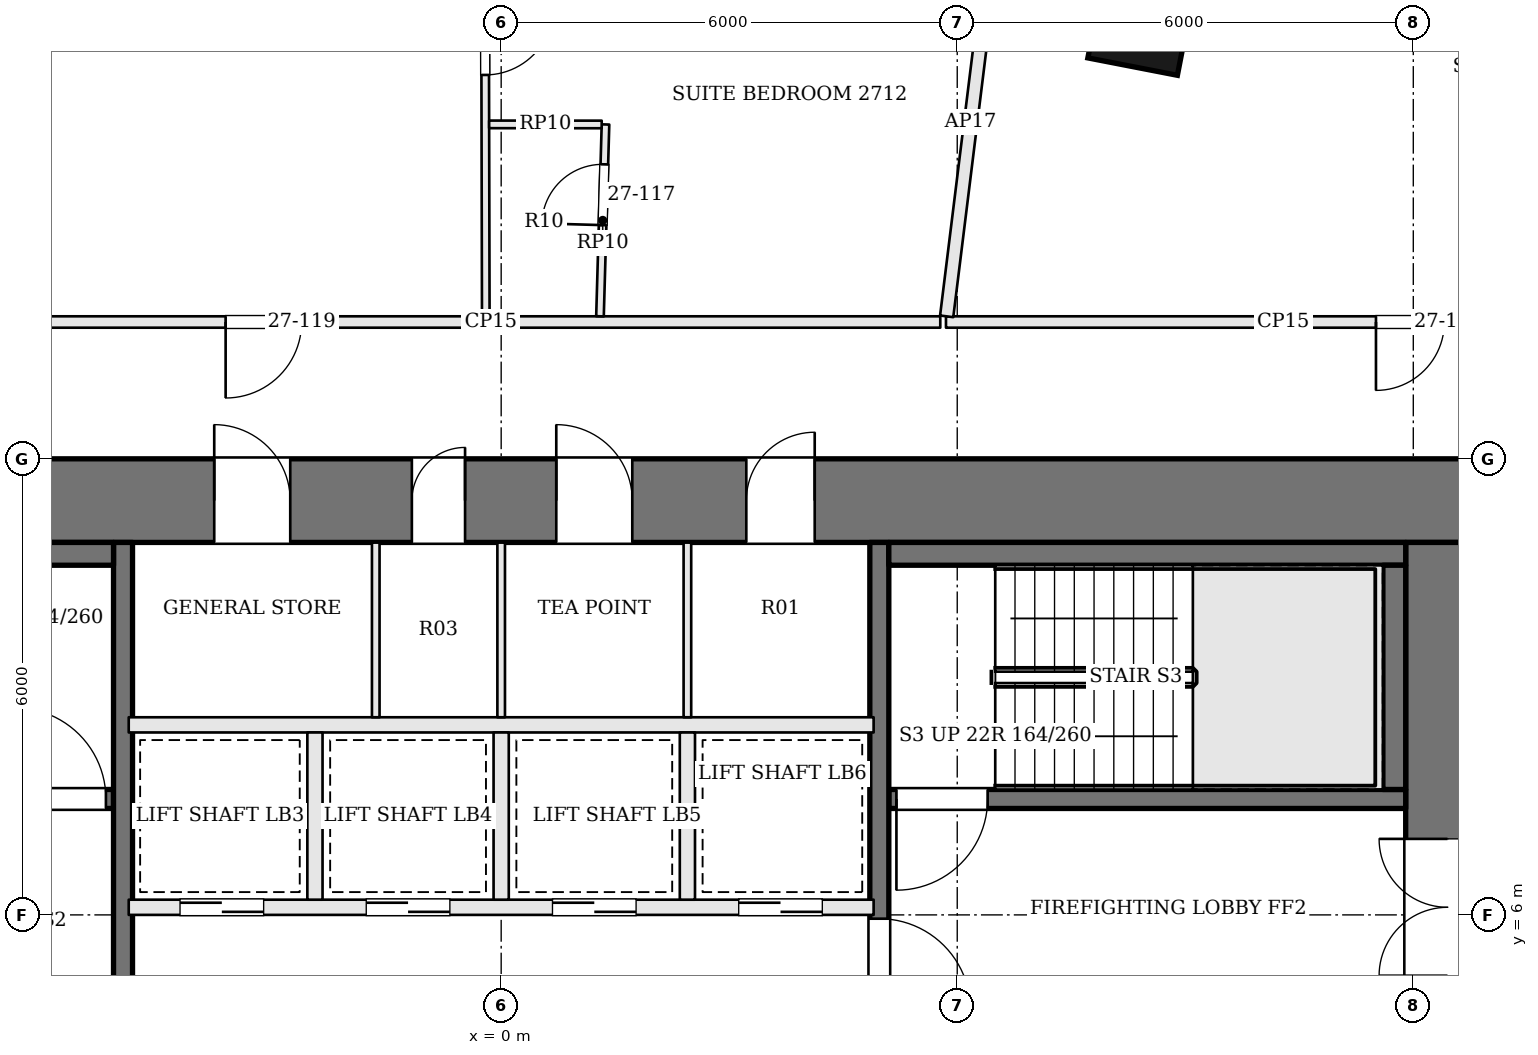
"""IFC4 building model, lengths in metres.
Left out: names, types, materials, properties, quantities, classifications, styles, units other than length and angle.
Written with IfcOpenShell. Run it as: python <this file> out.ifc"""

import sys

from ifc_helpers import new_model, si_unit, direction, frame, frame_2d, origin, origin_2d, place, context, subcontext, project, spatial, rectangle, extrude, element, fill, save


model = new_model("IFC4")
c1 = context("Model", 3, precision=1e-05, world=origin(), true_north=direction((0.0, 1.0)))
c2 = subcontext(c1, "Body", "Model", "MODEL_VIEW")
j1 = project(units=[si_unit("LENGTHUNIT", "METRE"), si_unit("PLANEANGLEUNIT", "RADIAN")], contexts=[c1])
p1 = place(None, origin())
s1 = spatial("IfcSite", under=j1, at=p1, CompositionType="ELEMENT")
p2 = place(p1, origin())
s2 = spatial("IfcBuilding", under=s1, at=p2, CompositionType="ELEMENT")
p3 = place(p2, frame((0.0, 0.0, 114.0)))
s3 = spatial("IfcBuildingStorey", under=s2, at=p3, CompositionType="ELEMENT", Elevation=114.0)
p4 = place(p3, frame((-13.0, 11.45, 0.0), z_axis=(0.0, 0.0, 1.0), x_axis=(1.0, 0.0, 0.0)))
e1 = element("IfcWall", 1, at=p4, inside=s3, PredefinedType="SHEAR", context=c2, shape_type="SweptSolid", body=[
    extrude(rectangle(XDim=26.0, YDim=1.1, at=frame_2d((13.0, 0.0))), origin(), (0.0, 0.0, 1.0), 3.6),
])
p5 = place(p4, frame((9.225, 0.0, 0.0)))
e2 = element("IfcOpeningElement", 2, at=p5, cuts=e1, PredefinedType="OPENING", context=c2, shape_type="SweptSolid", body=[
    extrude(rectangle(XDim=1.0, YDim=2.1, at=frame_2d((0.5, 1.05))), frame((0.0, 0.56, 0.0), z_axis=(0.0, -1.0, 0.0), x_axis=(1.0, 0.0, 0.0)), (0.0, 0.0, 1.0), 1.12),
])
p6 = place(p4, frame((11.825, 0.0, 0.0)))
e3 = element("IfcOpeningElement", 3, at=p6, cuts=e1, PredefinedType="OPENING", context=c2, shape_type="SweptSolid", body=[
    extrude(rectangle(XDim=0.7, YDim=2.1, at=frame_2d((0.35, 1.05))), frame((0.0, 0.56, 0.0), z_axis=(0.0, -1.0, 0.0), x_axis=(1.0, 0.0, 0.0)), (0.0, 0.0, 1.0), 1.12),
])
p7 = place(p4, frame((13.725, 0.0, 0.0)))
e4 = element("IfcOpeningElement", 4, at=p7, cuts=e1, PredefinedType="OPENING", context=c2, shape_type="SweptSolid", body=[
    extrude(rectangle(XDim=1.0, YDim=2.1, at=frame_2d((0.5, 1.05))), frame((0.0, 0.56, 0.0), z_axis=(0.0, -1.0, 0.0), x_axis=(1.0, 0.0, 0.0)), (0.0, 0.0, 1.0), 1.12),
])
p8 = place(p4, frame((16.225, 0.0, 0.0)))
e5 = element("IfcOpeningElement", 5, at=p8, cuts=e1, PredefinedType="OPENING", context=c2, shape_type="SweptSolid", body=[
    extrude(rectangle(XDim=0.9, YDim=2.1, at=frame_2d((0.45, 1.05))), frame((0.0, 0.56, 0.0), z_axis=(0.0, -1.0, 0.0), x_axis=(1.0, 0.0, 0.0)), (0.0, 0.0, 1.0), 1.12),
])
p9 = place(p3, frame((12.45, -1.9, 0.0), z_axis=(0.0, 0.0, 1.0), x_axis=(0.0, 1.0, 0.0)))
e6 = element("IfcWall", 6, at=p9, inside=s3, PredefinedType="SHEAR", context=c2, shape_type="SweptSolid", body=[
    extrude(rectangle(XDim=12.8, YDim=1.1, at=frame_2d((6.4, 0.0))), origin(), (0.0, 0.0, 1.0), 3.6),
])
p10 = place(p9, frame((7.1, 0.0, 0.0)))
e7 = element("IfcOpeningElement", 7, at=p10, cuts=e6, PredefinedType="OPENING", context=c2, shape_type="SweptSolid", body=[
    extrude(rectangle(XDim=1.8, YDim=2.1, at=frame_2d((0.9, 1.05))), frame((0.0, 0.56, 0.0), z_axis=(0.0, -1.0, 0.0), x_axis=(1.0, 0.0, 0.0)), (0.0, 0.0, 1.0), 1.12),
])
p11 = place(p3, frame((8.422, 17.749, 0.0), z_axis=(0.0, 0.0, 1.0), x_axis=(-0.981654668733, 0.19066754143, 0.0)))
e8 = element("IfcColumn", 8, at=p11, inside=s3, PredefinedType="COLUMN", context=c2, shape_type="SweptSolid", body=[
    extrude(rectangle(XDim=1.2, YDim=1.2, at=origin_2d()), origin(), (0.0, 0.0, 1.0), 3.6),
])
p12 = place(p3, frame((11.9, 7.525, 0.0), z_axis=(0.0, 0.0, 1.0), x_axis=(-1.0, 0.0, 0.0)))
e9 = element("IfcWall", 9, at=p12, inside=s3, PredefinedType="SOLIDWALL", context=c2, shape_type="SweptSolid", body=[
    extrude(rectangle(XDim=6.8, YDim=0.25, at=frame_2d((3.4, 0.0))), origin(), (0.0, 0.0, 1.0), 3.4),
])
p13 = place(p12, frame((5.5, 0.0, 0.0)))
e10 = element("IfcOpeningElement", 10, at=p13, cuts=e9, PredefinedType="OPENING", context=c2, shape_type="SweptSolid", body=[
    extrude(rectangle(XDim=1.2, YDim=2.1, at=frame_2d((0.6, 1.05))), frame((0.0, 0.135, 0.0), z_axis=(0.0, -1.0, 0.0), x_axis=(1.0, 0.0, 0.0)), (0.0, 0.0, 1.0), 0.27),
])
p14 = place(p3, frame((-11.9, 7.525, 0.0), z_axis=(0.0, 0.0, 1.0), x_axis=(1.0, 0.0, 0.0)))
e11 = element("IfcWall", 11, at=p14, inside=s3, PredefinedType="SOLIDWALL", context=c2, shape_type="SweptSolid", body=[
    extrude(rectangle(XDim=6.8, YDim=0.25, at=frame_2d((3.4, 0.0))), origin(), (0.0, 0.0, 1.0), 3.4),
])
p15 = place(p14, frame((5.5, 0.0, 0.0)))
e12 = element("IfcOpeningElement", 12, at=p15, cuts=e11, PredefinedType="OPENING", context=c2, shape_type="SweptSolid", body=[
    extrude(rectangle(XDim=1.2, YDim=2.1, at=frame_2d((0.6, 1.05))), frame((0.0, 0.135, 0.0), z_axis=(0.0, -1.0, 0.0), x_axis=(1.0, 0.0, 0.0)), (0.0, 0.0, 1.0), 0.27),
])
p16 = place(p3, frame((-4.975, -1.9, 0.0), z_axis=(0.0, 0.0, 1.0), x_axis=(0.0, 1.0, 0.0)))
e13 = element("IfcWall", 13, at=p16, inside=s3, PredefinedType="SOLIDWALL", context=c2, shape_type="SweptSolid", body=[
    extrude(rectangle(XDim=12.8, YDim=0.25, at=frame_2d((6.4, 0.0))), origin(), (0.0, 0.0, 1.0), 3.4),
])
p17 = place(p16, frame((4.95, 0.0, 0.0)))
e14 = element("IfcOpeningElement", 14, at=p17, cuts=e13, PredefinedType="OPENING", context=c2, shape_type="SweptSolid", body=[
    extrude(rectangle(XDim=1.2, YDim=2.1, at=frame_2d((0.6, 1.05))), frame((0.0, 0.135, 0.0), z_axis=(0.0, -1.0, 0.0), x_axis=(1.0, 0.0, 0.0)), (0.0, 0.0, 1.0), 0.27),
])
p18 = place(p3, frame((4.975, 10.9, 0.0), z_axis=(0.0, 0.0, 1.0), x_axis=(0.0, -1.0, 0.0)))
e15 = element("IfcWall", 15, at=p18, inside=s3, PredefinedType="SOLIDWALL", context=c2, shape_type="SweptSolid", body=[
    extrude(rectangle(XDim=12.8, YDim=0.25, at=frame_2d((6.4, 0.0))), origin(), (0.0, 0.0, 1.0), 3.4),
])
p19 = place(p18, frame((4.95, 0.0, 0.0)))
e16 = element("IfcOpeningElement", 16, at=p19, cuts=e15, PredefinedType="OPENING", context=c2, shape_type="SweptSolid", body=[
    extrude(rectangle(XDim=1.2, YDim=2.1, at=frame_2d((0.6, 1.05))), frame((0.0, 0.135, 0.0), z_axis=(0.0, -1.0, 0.0), x_axis=(1.0, 0.0, 0.0)), (0.0, 0.0, 1.0), 0.27),
])
for number, where, z_axis, x_axis in (
    (17, (-11.9, 10.75, 0.0), (0.0, 0.0, 1.0), (1.0, 0.0, 0.0)),
    (18, (11.9, 10.75, 0.0), (0.0, 0.0, 1.0), (-1.0, 0.0, 0.0)),
):
    element("IfcWall", number, at=place(p3, frame(where, z_axis=z_axis, x_axis=x_axis)), inside=s3, PredefinedType="SOLIDWALL", context=c2, shape_type="SweptSolid", body=[
        extrude(rectangle(XDim=6.8, YDim=0.3, at=frame_2d((3.4, 0.0))), origin(), (0.0, 0.0, 1.0), 3.4),
    ])
p20 = place(p3, frame((11.75, 10.6, 0.0), z_axis=(0.0, 0.0, 1.0), x_axis=(0.0, -1.0, 0.0)))
e19 = element("IfcWall", 19, at=p20, inside=s3, PredefinedType="SOLIDWALL", context=c2, shape_type="SweptSolid", body=[
    extrude(rectangle(XDim=2.95, YDim=0.3, at=frame_2d((1.475, 0.0))), origin(), (0.0, 0.0, 1.0), 3.4),
])
p21 = place(p3, frame((-4.9, 6.1, 0.0), z_axis=(0.0, 0.0, 1.0), x_axis=(1.0, 0.0, 0.0)))
e20 = element("IfcWall", 20, at=p21, inside=s3, PredefinedType="SOLIDWALL", context=c2, shape_type="SweptSolid", body=[
    extrude(rectangle(XDim=9.8, YDim=0.2, at=frame_2d((4.9, 0.0))), origin(), (0.0, 0.0, 1.0), 3.4),
])
p22 = place(p21, frame((0.675, 0.0, 0.0)))
e21 = element("IfcOpeningElement", 21, at=p22, cuts=e20, PredefinedType="OPENING", context=c2, shape_type="SweptSolid", body=[
    extrude(rectangle(XDim=1.1, YDim=2.1, at=frame_2d((0.55, 1.05))), frame((0.0, 0.11, 0.0), z_axis=(0.0, -1.0, 0.0), x_axis=(1.0, 0.0, 0.0)), (0.0, 0.0, 1.0), 0.22),
])
p23 = place(p21, frame((3.125, 0.0, 0.0)))
e22 = element("IfcOpeningElement", 22, at=p23, cuts=e20, PredefinedType="OPENING", context=c2, shape_type="SweptSolid", body=[
    extrude(rectangle(XDim=1.1, YDim=2.1, at=frame_2d((0.55, 1.05))), frame((0.0, 0.11, 0.0), z_axis=(0.0, -1.0, 0.0), x_axis=(1.0, 0.0, 0.0)), (0.0, 0.0, 1.0), 0.22),
])
p24 = place(p21, frame((5.575, 0.0, 0.0)))
e23 = element("IfcOpeningElement", 23, at=p24, cuts=e20, PredefinedType="OPENING", context=c2, shape_type="SweptSolid", body=[
    extrude(rectangle(XDim=1.1, YDim=2.1, at=frame_2d((0.55, 1.05))), frame((0.0, 0.11, 0.0), z_axis=(0.0, -1.0, 0.0), x_axis=(1.0, 0.0, 0.0)), (0.0, 0.0, 1.0), 0.22),
])
p25 = place(p21, frame((8.025, 0.0, 0.0)))
e24 = element("IfcOpeningElement", 24, at=p25, cuts=e20, PredefinedType="OPENING", context=c2, shape_type="SweptSolid", body=[
    extrude(rectangle(XDim=1.1, YDim=2.1, at=frame_2d((0.55, 1.05))), frame((0.0, 0.11, 0.0), z_axis=(0.0, -1.0, 0.0), x_axis=(1.0, 0.0, 0.0)), (0.0, 0.0, 1.0), 0.22),
])
p26 = place(p3, frame((-4.9, 8.5, 0.0), z_axis=(0.0, 0.0, 1.0), x_axis=(1.0, 0.0, 0.0)))
e25 = element("IfcWall", 25, at=p26, inside=s3, PredefinedType="SOLIDWALL", context=c2, shape_type="SweptSolid", body=[
    extrude(rectangle(XDim=9.8, YDim=0.2, at=frame_2d((4.9, 0.0))), origin(), (0.0, 0.0, 1.0), 3.4),
])
for number, where, z_axis, x_axis in (
    (26, (-2.45, 6.2, 0.0), (0.0, 0.0, 1.0), (0.0, 1.0, 0.0)),
    (27, (0.0, 6.2, 0.0), (0.0, 0.0, 1.0), (0.0, 1.0, 0.0)),
    (28, (2.45, 6.2, 0.0), (0.0, 0.0, 1.0), (0.0, 1.0, 0.0)),
):
    element("IfcWall", number, at=place(p3, frame(where, z_axis=z_axis, x_axis=x_axis)), inside=s3, PredefinedType="SOLIDWALL", context=c2, shape_type="SweptSolid", body=[
        extrude(rectangle(XDim=2.2, YDim=0.2, at=frame_2d((1.1, 0.0))), origin(), (0.0, 0.0, 1.0), 3.4),
    ])
for number, where, z_axis, x_axis in (
    (29, (-1.65, 8.6, 0.0), (0.0, 0.0, 1.0), (0.0, 1.0, 0.0)),
    (30, (0.0, 8.6, 0.0), (0.0, 0.0, 1.0), (0.0, 1.0, 0.0)),
    (31, (2.45, 8.6, 0.0), (0.0, 0.0, 1.0), (0.0, 1.0, 0.0)),
):
    element("IfcWall", number, at=place(p3, frame(where, z_axis=z_axis, x_axis=x_axis)), inside=s3, PredefinedType="PARTITIONING", context=c2, shape_type="SweptSolid", body=[
        extrude(rectangle(XDim=2.3, YDim=0.1, at=frame_2d((1.15, 0.0))), origin(), (0.0, 0.0, 1.0), 3.4),
    ])
p27 = place(p3, frame((14.725, 13.8, 0.0), z_axis=(0.0, 0.0, 1.0), x_axis=(-1.0, 0.0, 0.0)))
e32 = element("IfcWall", 32, at=p27, inside=s3, PredefinedType="PARTITIONING", context=c2, shape_type="SweptSolid", body=[
    extrude(rectangle(XDim=8.873, YDim=0.15, at=frame_2d((4.437, 0.0))), origin(), (0.0, 0.0, 1.0), 2.784),
])
p28 = place(p27, frame((2.316, 0.0, 0.0)))
e33 = element("IfcOpeningElement", 33, at=p28, cuts=e32, PredefinedType="OPENING", context=c2, shape_type="SweptSolid", body=[
    extrude(rectangle(XDim=0.9, YDim=2.4, at=frame_2d((0.45, 1.2))), frame((0.0, 0.085, 0.0), z_axis=(0.0, -1.0, 0.0), x_axis=(1.0, 0.0, 0.0)), (0.0, 0.0, 1.0), 0.17),
])
p29 = place(p3, frame((6.493, 18.982, 0.0), z_axis=(0.0, 0.0, 1.0), x_axis=(-0.122808633413, -0.992430370131, 0.0)))
e34 = element("IfcWall", 34, at=p29, inside=s3, PredefinedType="PARTITIONING", context=c2, shape_type="SweptSolid", body=[
    extrude(rectangle(XDim=5.147, YDim=0.175, at=frame_2d((2.573, 0.0))), origin(), (0.0, 0.0, 1.0), 2.784),
])
p30 = place(p3, frame((5.777, 13.8, 0.0), z_axis=(0.0, 0.0, 1.0), x_axis=(-1.0, 0.0, 0.0)))
e35 = element("IfcWall", 35, at=p30, inside=s3, PredefinedType="PARTITIONING", context=c2, shape_type="SweptSolid", body=[
    extrude(rectangle(XDim=11.824, YDim=0.15, at=frame_2d((5.912, 0.0))), origin(), (0.0, 0.0, 1.0), 2.784),
])
p31 = place(p30, frame((8.402, 0.0, 0.0)))
e36 = element("IfcOpeningElement", 36, at=p31, cuts=e35, PredefinedType="OPENING", context=c2, shape_type="SweptSolid", body=[
    extrude(rectangle(XDim=1.0, YDim=2.1, at=frame_2d((0.5, 1.05))), frame((0.0, 0.085, 0.0), z_axis=(0.0, -1.0, 0.0), x_axis=(1.0, 0.0, 0.0)), (0.0, 0.0, 1.0), 0.17),
])
p32 = place(p3, frame((-0.219, 21.059, 0.0), z_axis=(0.0, 0.0, 1.0), x_axis=(0.002344778955, -0.999997251002, 0.0)))
e37 = element("IfcWall", 37, at=p32, inside=s3, PredefinedType="PARTITIONING", context=c2, shape_type="SweptSolid", body=[
    extrude(rectangle(XDim=7.184, YDim=0.1, at=frame_2d((3.592, 0.0))), origin(), (0.0, 0.0, 1.0), 2.884),
])
p33 = place(p32, frame((3.109, 0.0, 0.0)))
e38 = element("IfcOpeningElement", 38, at=p33, cuts=e37, PredefinedType="OPENING", context=c2, shape_type="SweptSolid", body=[
    extrude(rectangle(XDim=0.9, YDim=2.4, at=frame_2d((0.45, 1.2))), frame((0.0, 0.06, 0.0), z_axis=(0.0, -1.0, 0.0), x_axis=(1.0, 0.0, 0.0)), (0.0, 0.0, 1.0), 0.12),
])
p34 = place(p3, frame((1.3, 13.875, 0.0), z_axis=(0.0, 0.0, 1.0), x_axis=(0.028620501399, 0.999590349543, 0.0)))
e39 = element("IfcWall", 39, at=p34, inside=s3, PredefinedType="PARTITIONING", context=c2, shape_type="SweptSolid", body=[
    extrude(rectangle(XDim=2.525, YDim=0.1, at=frame_2d((1.262, 0.0))), origin(), (0.0, 0.0, 1.0), 2.884),
])
p35 = place(p34, frame((1.2, 0.0, 0.0)))
e40 = element("IfcOpeningElement", 40, at=p35, cuts=e39, PredefinedType="OPENING", context=c2, shape_type="SweptSolid", body=[
    extrude(rectangle(XDim=0.8, YDim=2.1, at=frame_2d((0.4, 1.05))), frame((0.0, 0.06, 0.0), z_axis=(0.0, -1.0, 0.0), x_axis=(1.0, 0.0, 0.0)), (0.0, 0.0, 1.0), 0.12),
])
p36 = place(p3, frame((1.323, 16.399, 0.0), z_axis=(0.0, 0.0, 1.0), x_axis=(-0.999999782516, 0.000659521703, 0.0)))
e41 = element("IfcWall", 41, at=p36, inside=s3, PredefinedType="PARTITIONING", context=c2, shape_type="SweptSolid", body=[
    extrude(rectangle(XDim=1.481, YDim=0.1, at=frame_2d((0.74, 0.0))), origin(), (0.0, 0.0, 1.0), 2.884),
])
p37 = place(p10, origin())
e42 = element("IfcDoor", 42, at=p37, inside=s3, OperationType="DOUBLE_DOOR_SINGLE_SWING", PredefinedType="DOOR", context=c2, shape_type="SweptSolid", body=[
    extrude(rectangle(XDim=1.8, YDim=2.1, at=frame_2d((0.9, 1.05))), frame((0.0, 0.025, 0.0), z_axis=(0.0, -1.0, 0.0), x_axis=(1.0, 0.0, 0.0)), (0.0, 0.0, 1.0), 0.05),
])
fill(e7, e42)
p38 = place(p19, origin())
e43 = element("IfcDoor", 43, at=p38, inside=s3, OperationType="SINGLE_SWING_RIGHT", PredefinedType="DOOR", context=c2, shape_type="SweptSolid", body=[
    extrude(rectangle(XDim=1.2, YDim=2.1, at=frame_2d((0.6, 1.05))), frame((0.0, 0.025, 0.0), z_axis=(0.0, -1.0, 0.0), x_axis=(1.0, 0.0, 0.0)), (0.0, 0.0, 1.0), 0.05),
])
fill(e16, e43)
p39 = place(p13, origin())
e44 = element("IfcDoor", 44, at=p39, inside=s3, OperationType="SINGLE_SWING_RIGHT", PredefinedType="DOOR", context=c2, shape_type="SweptSolid", body=[
    extrude(rectangle(XDim=1.2, YDim=2.1, at=frame_2d((0.6, 1.05))), frame((0.0, 0.025, 0.0), z_axis=(0.0, -1.0, 0.0), x_axis=(1.0, 0.0, 0.0)), (0.0, 0.0, 1.0), 0.05),
])
fill(e10, e44)
p40 = place(p15, origin())
e45 = element("IfcDoor", 45, at=p40, inside=s3, OperationType="SINGLE_SWING_LEFT", PredefinedType="DOOR", context=c2, shape_type="SweptSolid", body=[
    extrude(rectangle(XDim=1.2, YDim=2.1, at=frame_2d((0.6, 1.05))), frame((0.0, 0.025, 0.0), z_axis=(0.0, -1.0, 0.0), x_axis=(1.0, 0.0, 0.0)), (0.0, 0.0, 1.0), 0.05),
])
fill(e12, e45)
p41 = place(p22, origin())
e46 = element("IfcDoor", 46, at=p41, inside=s3, OperationType="SLIDING_TO_RIGHT", PredefinedType="DOOR", context=c2, shape_type="SweptSolid", body=[
    extrude(rectangle(XDim=1.1, YDim=2.1, at=frame_2d((0.55, 1.05))), frame((0.0, 0.025, 0.0), z_axis=(0.0, -1.0, 0.0), x_axis=(1.0, 0.0, 0.0)), (0.0, 0.0, 1.0), 0.05),
])
fill(e21, e46)
p42 = place(p23, origin())
e47 = element("IfcDoor", 47, at=p42, inside=s3, OperationType="SLIDING_TO_LEFT", PredefinedType="DOOR", context=c2, shape_type="SweptSolid", body=[
    extrude(rectangle(XDim=1.1, YDim=2.1, at=frame_2d((0.55, 1.05))), frame((0.0, 0.025, 0.0), z_axis=(0.0, -1.0, 0.0), x_axis=(1.0, 0.0, 0.0)), (0.0, 0.0, 1.0), 0.05),
])
fill(e22, e47)
p43 = place(p24, origin())
e48 = element("IfcDoor", 48, at=p43, inside=s3, OperationType="SLIDING_TO_RIGHT", PredefinedType="DOOR", context=c2, shape_type="SweptSolid", body=[
    extrude(rectangle(XDim=1.1, YDim=2.1, at=frame_2d((0.55, 1.05))), frame((0.0, 0.025, 0.0), z_axis=(0.0, -1.0, 0.0), x_axis=(1.0, 0.0, 0.0)), (0.0, 0.0, 1.0), 0.05),
])
fill(e23, e48)
p44 = place(p25, origin())
e49 = element("IfcDoor", 49, at=p44, inside=s3, OperationType="SLIDING_TO_LEFT", PredefinedType="DOOR", context=c2, shape_type="SweptSolid", body=[
    extrude(rectangle(XDim=1.1, YDim=2.1, at=frame_2d((0.55, 1.05))), frame((0.0, 0.025, 0.0), z_axis=(0.0, -1.0, 0.0), x_axis=(1.0, 0.0, 0.0)), (0.0, 0.0, 1.0), 0.05),
])
fill(e24, e49)
p45 = place(p5, origin())
e50 = element("IfcDoor", 50, at=p45, inside=s3, OperationType="SINGLE_SWING_LEFT", PredefinedType="DOOR", context=c2, shape_type="SweptSolid", body=[
    extrude(rectangle(XDim=1.0, YDim=2.1, at=frame_2d((0.5, 1.05))), frame((0.0, 0.025, 0.0), z_axis=(0.0, -1.0, 0.0), x_axis=(1.0, 0.0, 0.0)), (0.0, 0.0, 1.0), 0.05),
])
fill(e2, e50)
p46 = place(p6, origin())
e51 = element("IfcDoor", 51, at=p46, inside=s3, OperationType="SINGLE_SWING_RIGHT", PredefinedType="DOOR", context=c2, shape_type="SweptSolid", body=[
    extrude(rectangle(XDim=0.7, YDim=2.1, at=frame_2d((0.35, 1.05))), frame((0.0, 0.025, 0.0), z_axis=(0.0, -1.0, 0.0), x_axis=(1.0, 0.0, 0.0)), (0.0, 0.0, 1.0), 0.05),
])
fill(e3, e51)
p47 = place(p7, origin())
e52 = element("IfcDoor", 52, at=p47, inside=s3, OperationType="SINGLE_SWING_LEFT", PredefinedType="DOOR", context=c2, shape_type="SweptSolid", body=[
    extrude(rectangle(XDim=1.0, YDim=2.1, at=frame_2d((0.5, 1.05))), frame((0.0, 0.025, 0.0), z_axis=(0.0, -1.0, 0.0), x_axis=(1.0, 0.0, 0.0)), (0.0, 0.0, 1.0), 0.05),
])
fill(e4, e52)
p48 = place(p8, origin())
e53 = element("IfcDoor", 53, at=p48, inside=s3, OperationType="SINGLE_SWING_RIGHT", PredefinedType="DOOR", context=c2, shape_type="SweptSolid", body=[
    extrude(rectangle(XDim=0.9, YDim=2.1, at=frame_2d((0.45, 1.05))), frame((0.0, 0.025, 0.0), z_axis=(0.0, -1.0, 0.0), x_axis=(1.0, 0.0, 0.0)), (0.0, 0.0, 1.0), 0.05),
])
fill(e5, e53)
p49 = place(p28, origin())
e54 = element("IfcDoor", 54, at=p49, inside=s3, OperationType="SINGLE_SWING_RIGHT", PredefinedType="DOOR", context=c2, shape_type="SweptSolid", body=[
    extrude(rectangle(XDim=0.9, YDim=2.4, at=frame_2d((0.45, 1.2))), frame((0.0, 0.025, 0.0), z_axis=(0.0, -1.0, 0.0), x_axis=(1.0, 0.0, 0.0)), (0.0, 0.0, 1.0), 0.05),
])
fill(e33, e54)
p50 = place(p35, origin())
e55 = element("IfcDoor", 55, at=p50, inside=s3, OperationType="SINGLE_SWING_LEFT", PredefinedType="DOOR", context=c2, shape_type="SweptSolid", body=[
    extrude(rectangle(XDim=0.8, YDim=2.1, at=frame_2d((0.4, 1.05))), frame((0.0, 0.025, 0.0), z_axis=(0.0, -1.0, 0.0), x_axis=(1.0, 0.0, 0.0)), (0.0, 0.0, 1.0), 0.05),
])
fill(e40, e55)
p51 = place(p33, origin())
e56 = element("IfcDoor", 56, at=p51, inside=s3, OperationType="SINGLE_SWING_LEFT", PredefinedType="DOOR", context=c2, shape_type="SweptSolid", body=[
    extrude(rectangle(XDim=0.9, YDim=2.4, at=frame_2d((0.45, 1.2))), frame((0.0, 0.025, 0.0), z_axis=(0.0, -1.0, 0.0), x_axis=(1.0, 0.0, 0.0)), (0.0, 0.0, 1.0), 0.05),
])
fill(e38, e56)
p52 = place(p31, origin())
e57 = element("IfcDoor", 57, at=p52, inside=s3, OperationType="SINGLE_SWING_RIGHT", PredefinedType="DOOR", context=c2, shape_type="SweptSolid", body=[
    extrude(rectangle(XDim=1.0, YDim=2.1, at=frame_2d((0.5, 1.05))), frame((0.0, 0.025, 0.0), z_axis=(0.0, -1.0, 0.0), x_axis=(1.0, 0.0, 0.0)), (0.0, 0.0, 1.0), 0.05),
])
fill(e36, e57)
save(model, sys.argv[1])
